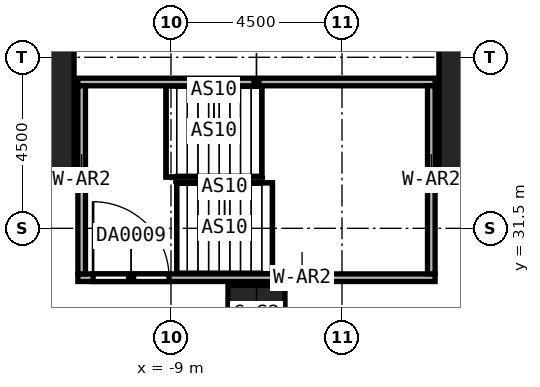
"""IFC4 building model, lengths in metres.
Left out: names, types, materials, properties, quantities, classifications, styles, units other than length and angle.
Written with IfcOpenShell. Run it as: python <this file> out.ifc"""

import sys

from ifc_helpers import new_model, si_unit, direction, frame, frame_2d, origin, origin_2d, place, context, subcontext, project, spatial, rectangle, extrude, element, fill, save


model = new_model("IFC4")
c1 = context("Model", 3, precision=1e-05, world=origin(), true_north=direction((0.0, 1.0)))
c2 = subcontext(c1, "Body", "Model", "MODEL_VIEW")
j1 = project(units=[si_unit("LENGTHUNIT", "METRE"), si_unit("PLANEANGLEUNIT", "RADIAN")], contexts=[c1])
p1 = place(None, origin())
s1 = spatial("IfcSite", under=j1, at=p1, CompositionType="ELEMENT")
p2 = place(p1, origin())
s2 = spatial("IfcBuilding", under=s1, at=p2, CompositionType="ELEMENT")
p3 = place(p2, frame((0.0, 0.0, 19.0)))
s3 = spatial("IfcBuildingStorey", under=s2, at=p3, CompositionType="ELEMENT", Elevation=19.0)
for number, where, z_axis, x_axis in (
    (1, (-13.5, 35.85, 0.0), (0.0, 0.0, 1.0), (1.0, 0.0, 0.0)),
    (2, (0.0, 35.85, 0.0), (0.0, 0.0, 1.0), (1.0, 0.0, 0.0)),
):
    element("IfcColumn", number, at=place(p3, frame(where, z_axis=z_axis, x_axis=x_axis)), inside=s3, PredefinedType="COLUMN", context=c2, shape_type="SweptSolid", body=[
        extrude(rectangle(XDim=3.9, YDim=6.3, at=origin_2d()), origin(), (0.0, 0.0, 1.0), 6.0),
    ])
p4 = place(p3, frame((-6.75, 29.25, 0.0), z_axis=(0.0, 0.0, 1.0), x_axis=(1.0, 0.0, 0.0)))
e3 = element("IfcColumn", 3, at=p4, inside=s3, PredefinedType="COLUMN", context=c2, shape_type="SweptSolid", body=[
    extrude(rectangle(XDim=1.5, YDim=1.5, at=origin_2d()), origin(), (0.0, 0.0, 1.0), 6.0),
])
p5 = place(p3, frame((-11.45, 30.2, 0.0), z_axis=(0.0, 0.0, 1.0), x_axis=(1.0, 0.0, 0.0)))
e4 = element("IfcWall", 4, at=p5, inside=s3, PredefinedType="SOLIDWALL", context=c2, shape_type="SweptSolid", body=[
    extrude(rectangle(XDim=9.4, YDim=0.2, at=frame_2d((4.7, 0.0))), origin(), (0.0, 0.0, 1.0), 6.0),
])
p6 = place(p5, frame((0.4, 0.0, 0.0)))
e5 = element("IfcOpeningElement", 5, at=p6, cuts=e4, PredefinedType="OPENING", context=c2, shape_type="SweptSolid", body=[
    extrude(rectangle(XDim=2.0, YDim=2.4, at=frame_2d((1.0, 1.2))), frame((0.0, 0.1, 0.0), z_axis=(0.0, -1.0, 0.0), x_axis=(1.0, 0.0, 0.0)), (0.0, 0.0, 1.0), 0.2),
])
p7 = place(p3, frame((-11.45, 35.35, 0.0), z_axis=(0.0, 0.0, 1.0), x_axis=(1.0, 0.0, 0.0)))
e6 = element("IfcWall", 6, at=p7, inside=s3, PredefinedType="SOLIDWALL", context=c2, shape_type="SweptSolid", body=[
    extrude(rectangle(XDim=9.4, YDim=0.2, at=frame_2d((4.7, 0.0))), origin(), (0.0, 0.0, 1.0), 6.0),
])
for number, where, z_axis, x_axis in (
    (7, (-11.35, 30.3, 0.0), (0.0, 0.0, 1.0), (0.0, 1.0, 0.0)),
    (8, (-2.15, 30.3, 0.0), (0.0, 0.0, 1.0), (0.0, 1.0, 0.0)),
):
    element("IfcWall", number, at=place(p3, frame(where, z_axis=z_axis, x_axis=x_axis)), inside=s3, PredefinedType="SOLIDWALL", context=c2, shape_type="SweptSolid", body=[
        extrude(rectangle(XDim=4.95, YDim=0.2, at=frame_2d((2.475, 0.0))), origin(), (0.0, 0.0, 1.0), 6.0),
    ])
p8 = place(p6, origin())
e9 = element("IfcDoor", 9, at=p8, inside=s3, OperationType="DOUBLE_DOOR_SINGLE_SWING", PredefinedType="DOOR", context=c2, shape_type="SweptSolid", body=[
    extrude(rectangle(XDim=2.0, YDim=2.4, at=frame_2d((1.0, 1.2))), frame((0.0, 0.025, 0.0), z_axis=(0.0, -1.0, 0.0), x_axis=(1.0, 0.0, 0.0)), (0.0, 0.0, 1.0), 0.05),
])
fill(e5, e9)
save(model, sys.argv[1])
